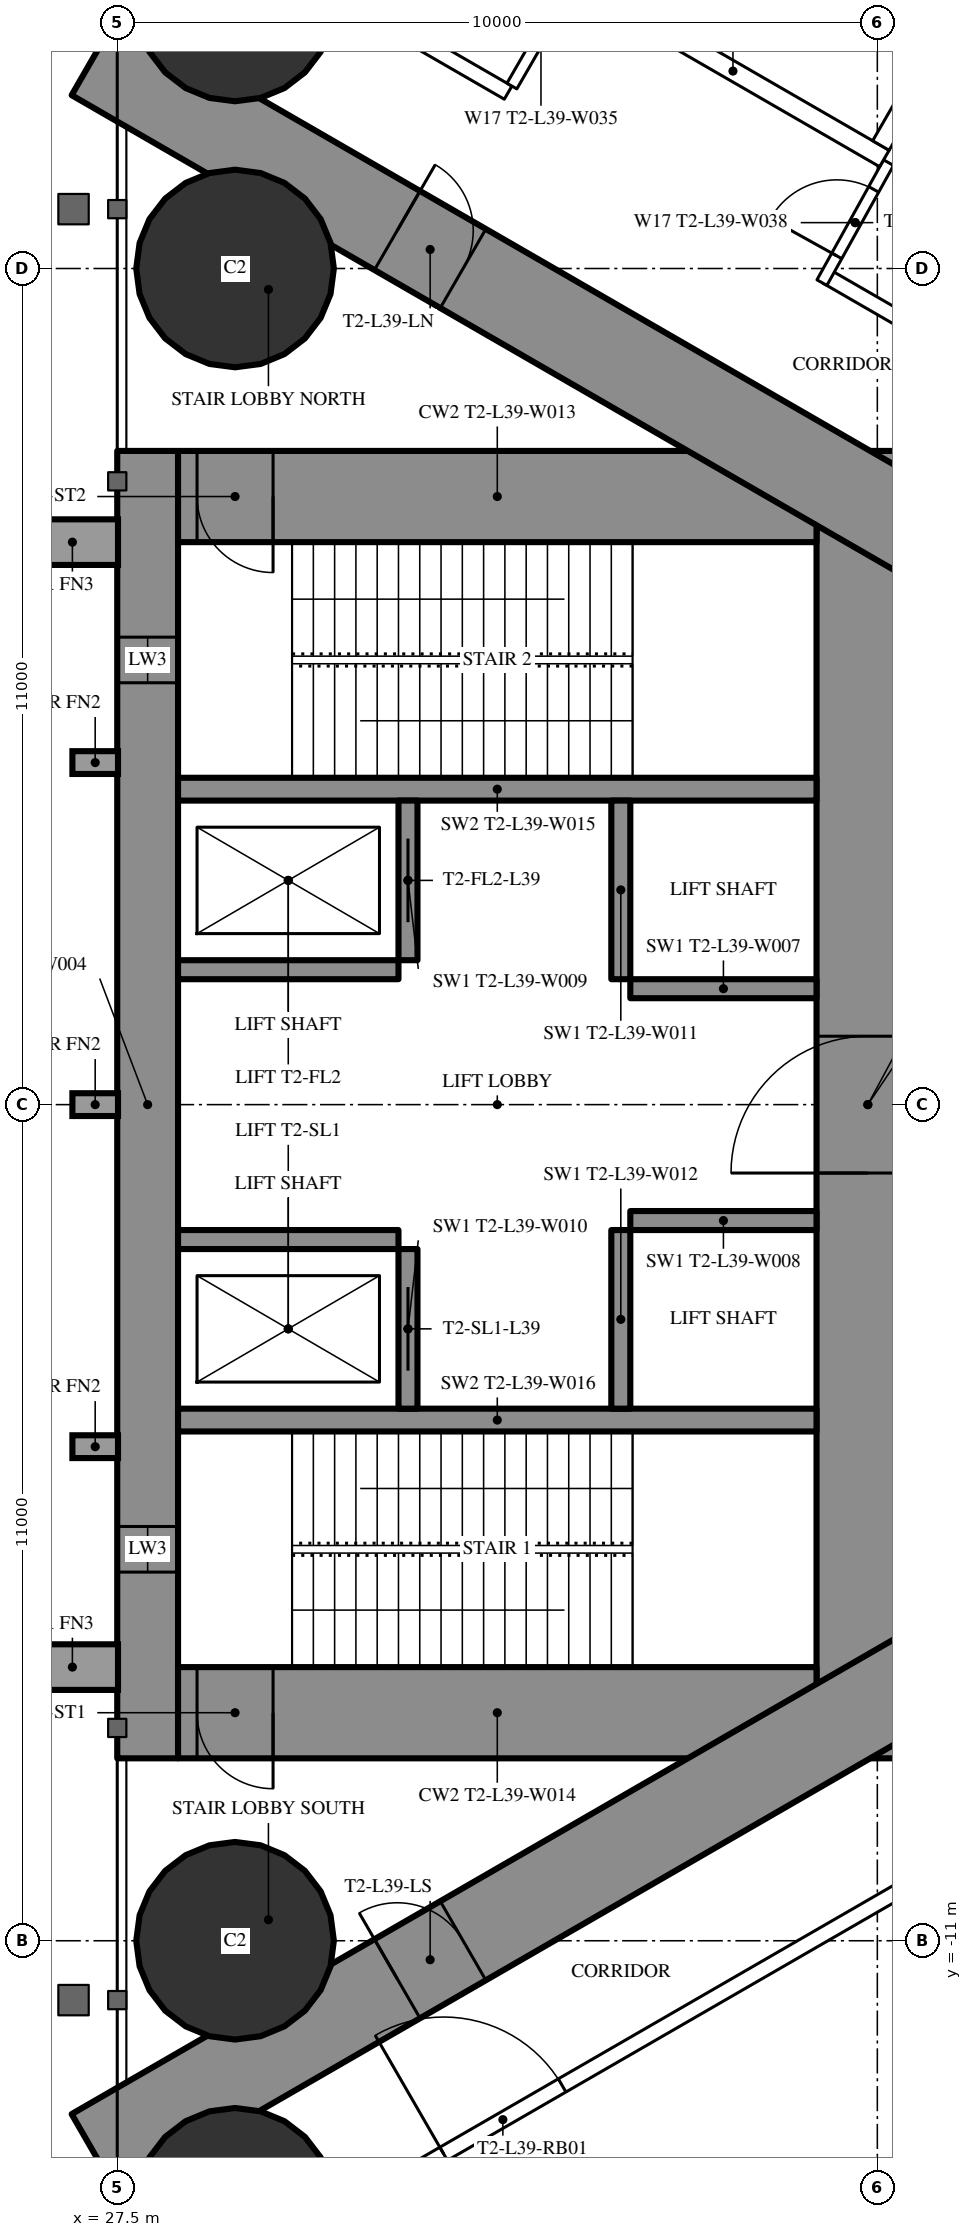
"""IFC4 building model, lengths in metres.
Left out: names, types, materials, properties, quantities, classifications, styles, units other than length and angle.
Written with IfcOpenShell. Run it as: python <this file> out.ifc"""

import sys

from ifc_helpers import new_model, si_unit, direction, frame, frame_2d, origin, origin_2d, place, context, subcontext, project, spatial, rectangle, hollow_circle, extrude, element, fill, save


model = new_model("IFC4")
c1 = context("Model", 3, precision=1e-05, world=origin(), true_north=direction((0.0, 1.0)))
c2 = subcontext(c1, "Body", "Model", "MODEL_VIEW")
j1 = project(units=[si_unit("LENGTHUNIT", "METRE"), si_unit("PLANEANGLEUNIT", "RADIAN")], contexts=[c1])
p1 = place(None, origin())
s1 = spatial("IfcSite", under=j1, at=p1, CompositionType="ELEMENT")
p2 = place(p1, origin())
s2 = spatial("IfcBuilding", under=s1, at=p2, CompositionType="ELEMENT")
p3 = place(p2, frame((0.0, 0.0, 146.7)))
s3 = spatial("IfcBuildingStorey", under=s2, at=p3, CompositionType="ELEMENT", Elevation=146.7)
for number, where, z_axis, x_axis in (
    (1, (29.05, 11.0, 0.0), (0.0, 0.0, 1.0), (1.0, 0.0, 0.0)),
    (2, (29.05, -11.0, 0.0), (0.0, 0.0, 1.0), (1.0, 0.0, 0.0)),
    (3, (29.05, -14.5, 0.0), (0.0, 0.0, 1.0), (1.0, 0.0, 0.0)),
    (4, (29.05, 14.5, 0.0), (0.0, 0.0, 1.0), (1.0, 0.0, 0.0)),
):
    element("IfcColumn", number, at=place(p3, frame(where, z_axis=z_axis, x_axis=x_axis)), inside=s3, PredefinedType="COLUMN", context=c2, shape_type="SweptSolid", body=[
        extrude(hollow_circle(Radius=1.3, WallThickness=0.1, at=origin_2d()), origin(), (0.0, 0.0, 1.0), 6.0),
    ])
p4 = place(p3, frame((27.9, -8.6, 0.0), z_axis=(0.0, 0.0, 1.0), x_axis=(0.0, 1.0, 0.0)))
e5 = element("IfcWall", 5, at=p4, inside=s3, PredefinedType="SHEAR", context=c2, shape_type="SweptSolid", body=[
    extrude(rectangle(XDim=17.2, YDim=0.8, at=frame_2d((8.6, 0.0))), origin(), (0.0, 0.0, 1.0), 6.0),
])
p5 = place(p4, frame((2.45, 0.0, 0.6)))
e6 = element("IfcOpeningElement", 6, at=p5, cuts=e5, PredefinedType="OPENING", context=c2, shape_type="SweptSolid", body=[
    extrude(rectangle(XDim=0.6, YDim=4.5, at=frame_2d((0.3, 2.25))), frame((0.0, 0.41, 0.0), z_axis=(0.0, -1.0, 0.0), x_axis=(1.0, 0.0, 0.0)), (0.0, 0.0, 1.0), 0.82),
])
p6 = place(p4, frame((14.15, 0.0, 0.6)))
e7 = element("IfcOpeningElement", 7, at=p6, cuts=e5, PredefinedType="OPENING", context=c2, shape_type="SweptSolid", body=[
    extrude(rectangle(XDim=0.6, YDim=4.5, at=frame_2d((0.3, 2.25))), frame((0.0, 0.41, 0.0), z_axis=(0.0, -1.0, 0.0), x_axis=(1.0, 0.0, 0.0)), (0.0, 0.0, 1.0), 0.82),
])
p7 = place(p3, frame((37.375, -8.6, 0.0), z_axis=(0.0, 0.0, 1.0), x_axis=(0.0, 1.0, 0.0)))
e8 = element("IfcWall", 8, at=p7, inside=s3, PredefinedType="SHEAR", context=c2, shape_type="SweptSolid", body=[
    extrude(rectangle(XDim=17.2, YDim=1.35, at=frame_2d((8.6, 0.0))), origin(), (0.0, 0.0, 1.0), 6.0),
])
p8 = place(p7, frame((7.7, 0.0, 0.0)))
e9 = element("IfcOpeningElement", 9, at=p8, cuts=e8, PredefinedType="OPENING", context=c2, shape_type="SweptSolid", body=[
    extrude(rectangle(XDim=1.8, YDim=2.2, at=frame_2d((0.9, 1.1))), frame((0.0, 0.685, 0.0), z_axis=(0.0, -1.0, 0.0), x_axis=(1.0, 0.0, 0.0)), (0.0, 0.0, 1.0), 1.37),
])
p9 = place(p3, frame((28.3, -8.0, 0.0), z_axis=(0.0, 0.0, 1.0), x_axis=(1.0, 0.0, 0.0)))
e10 = element("IfcWall", 10, at=p9, inside=s3, PredefinedType="SHEAR", context=c2, shape_type="SweptSolid", body=[
    extrude(rectangle(XDim=8.4, YDim=1.2, at=frame_2d((4.2, 0.0))), origin(), (0.0, 0.0, 1.0), 6.0),
])
p10 = place(p9, frame((0.25, 0.0, 0.0)))
e11 = element("IfcOpeningElement", 11, at=p10, cuts=e10, PredefinedType="OPENING", context=c2, shape_type="SweptSolid", body=[
    extrude(rectangle(XDim=1.0, YDim=2.2, at=frame_2d((0.5, 1.1))), frame((0.0, 0.61, 0.0), z_axis=(0.0, -1.0, 0.0), x_axis=(1.0, 0.0, 0.0)), (0.0, 0.0, 1.0), 1.22),
])
p11 = place(p3, frame((28.3, 8.0, 0.0), z_axis=(0.0, 0.0, 1.0), x_axis=(1.0, 0.0, 0.0)))
e12 = element("IfcWall", 12, at=p11, inside=s3, PredefinedType="SHEAR", context=c2, shape_type="SweptSolid", body=[
    extrude(rectangle(XDim=8.4, YDim=1.2, at=frame_2d((4.2, 0.0))), origin(), (0.0, 0.0, 1.0), 6.0),
])
p12 = place(p11, frame((0.25, 0.0, 0.0)))
e13 = element("IfcOpeningElement", 13, at=p12, cuts=e12, PredefinedType="OPENING", context=c2, shape_type="SweptSolid", body=[
    extrude(rectangle(XDim=1.0, YDim=2.2, at=frame_2d((0.5, 1.1))), frame((0.0, 0.61, 0.0), z_axis=(0.0, -1.0, 0.0), x_axis=(1.0, 0.0, 0.0)), (0.0, 0.0, 1.0), 1.22),
])
for number, where, z_axis, x_axis in (
    (14, (28.3, -4.15, 0.0), (0.0, 0.0, 1.0), (1.0, 0.0, 0.0)),
    (15, (28.3, 4.15, 0.0), (0.0, 0.0, 1.0), (1.0, 0.0, 0.0)),
):
    element("IfcWall", number, at=place(p3, frame(where, z_axis=z_axis, x_axis=x_axis)), inside=s3, PredefinedType="SHEAR", context=c2, shape_type="SweptSolid", body=[
        extrude(rectangle(XDim=8.4, YDim=0.3, at=frame_2d((4.2, 0.0))), origin(), (0.0, 0.0, 1.0), 6.0),
    ])
p13 = place(p3, frame((31.325, -4.0, 0.0), z_axis=(0.0, 0.0, 1.0), x_axis=(0.0, 1.0, 0.0)))
e16 = element("IfcWall", 16, at=p13, inside=s3, PredefinedType="SHEAR", context=c2, shape_type="SweptSolid", body=[
    extrude(rectangle(XDim=2.1, YDim=0.25, at=frame_2d((1.05, 0.0))), origin(), (0.0, 0.0, 1.0), 6.0),
])
p14 = place(p13, frame((0.5, 0.0, 0.0)))
e17 = element("IfcOpeningElement", 17, at=p14, cuts=e16, PredefinedType="OPENING", context=c2, shape_type="SweptSolid", body=[
    extrude(rectangle(XDim=1.1, YDim=2.2, at=frame_2d((0.55, 1.1))), frame((0.0, 0.135, 0.0), z_axis=(0.0, -1.0, 0.0), x_axis=(1.0, 0.0, 0.0)), (0.0, 0.0, 1.0), 0.27),
])
p15 = place(p3, frame((34.125, -4.0, 0.0), z_axis=(0.0, 0.0, 1.0), x_axis=(0.0, 1.0, 0.0)))
e18 = element("IfcWall", 18, at=p15, inside=s3, PredefinedType="SHEAR", context=c2, shape_type="SweptSolid", body=[
    extrude(rectangle(XDim=2.35, YDim=0.25, at=frame_2d((1.175, 0.0))), origin(), (0.0, 0.0, 1.0), 6.0),
])
p16 = place(p3, frame((28.3, -1.775, 0.0), z_axis=(0.0, 0.0, 1.0), x_axis=(1.0, 0.0, 0.0)))
e19 = element("IfcWall", 19, at=p16, inside=s3, PredefinedType="SHEAR", context=c2, shape_type="SweptSolid", body=[
    extrude(rectangle(XDim=2.9, YDim=0.25, at=frame_2d((1.45, 0.0))), origin(), (0.0, 0.0, 1.0), 6.0),
])
p17 = place(p3, frame((34.25, -1.525, 0.0), z_axis=(0.0, 0.0, 1.0), x_axis=(1.0, 0.0, 0.0)))
e20 = element("IfcWall", 20, at=p17, inside=s3, PredefinedType="SHEAR", context=c2, shape_type="SweptSolid", body=[
    extrude(rectangle(XDim=2.45, YDim=0.25, at=frame_2d((1.225, 0.0))), origin(), (0.0, 0.0, 1.0), 6.0),
])
p18 = place(p3, frame((31.325, 1.9, 0.0), z_axis=(0.0, 0.0, 1.0), x_axis=(0.0, 1.0, 0.0)))
e21 = element("IfcWall", 21, at=p18, inside=s3, PredefinedType="SHEAR", context=c2, shape_type="SweptSolid", body=[
    extrude(rectangle(XDim=2.1, YDim=0.25, at=frame_2d((1.05, 0.0))), origin(), (0.0, 0.0, 1.0), 6.0),
])
p19 = place(p18, frame((0.5, 0.0, 0.0)))
e22 = element("IfcOpeningElement", 22, at=p19, cuts=e21, PredefinedType="OPENING", context=c2, shape_type="SweptSolid", body=[
    extrude(rectangle(XDim=1.1, YDim=2.2, at=frame_2d((0.55, 1.1))), frame((0.0, 0.135, 0.0), z_axis=(0.0, -1.0, 0.0), x_axis=(1.0, 0.0, 0.0)), (0.0, 0.0, 1.0), 0.27),
])
p20 = place(p3, frame((34.125, 1.65, 0.0), z_axis=(0.0, 0.0, 1.0), x_axis=(0.0, 1.0, 0.0)))
e23 = element("IfcWall", 23, at=p20, inside=s3, PredefinedType="SHEAR", context=c2, shape_type="SweptSolid", body=[
    extrude(rectangle(XDim=2.35, YDim=0.25, at=frame_2d((1.175, 0.0))), origin(), (0.0, 0.0, 1.0), 6.0),
])
p21 = place(p3, frame((28.3, 1.775, 0.0), z_axis=(0.0, 0.0, 1.0), x_axis=(1.0, 0.0, 0.0)))
e24 = element("IfcWall", 24, at=p21, inside=s3, PredefinedType="SHEAR", context=c2, shape_type="SweptSolid", body=[
    extrude(rectangle(XDim=2.9, YDim=0.25, at=frame_2d((1.45, 0.0))), origin(), (0.0, 0.0, 1.0), 6.0),
])
p22 = place(p3, frame((34.25, 1.525, 0.0), z_axis=(0.0, 0.0, 1.0), x_axis=(1.0, 0.0, 0.0)))
e25 = element("IfcWall", 25, at=p22, inside=s3, PredefinedType="SHEAR", context=c2, shape_type="SweptSolid", body=[
    extrude(rectangle(XDim=2.45, YDim=0.25, at=frame_2d((1.225, 0.0))), origin(), (0.0, 0.0, 1.0), 6.0),
])
p23 = place(p3, frame((27.2, -13.8, 0.0), z_axis=(0.0, 0.0, 1.0), x_axis=(0.866027159892, 0.499996958321, 0.0)))
e26 = element("IfcWall", 26, at=p23, inside=s3, PredefinedType="SHEAR", context=c2, shape_type="SweptSolid", body=[
    extrude(rectangle(XDim=27.947, YDim=1.2, at=frame_2d((13.973, 0.0))), origin(), (0.0, 0.0, 1.0), 6.0),
])
p24 = place(p23, frame((4.6, 0.0, 0.0)))
e27 = element("IfcOpeningElement", 27, at=p24, cuts=e26, PredefinedType="OPENING", context=c2, shape_type="SweptSolid", body=[
    extrude(rectangle(XDim=1.0, YDim=2.2, at=frame_2d((0.5, 1.1))), frame((0.0, 0.61, 0.0), z_axis=(0.0, -1.0, 0.0), x_axis=(1.0, 0.0, 0.0)), (0.0, 0.0, 1.0), 1.22),
])
p25 = place(p23, frame((13.568, 0.0, 0.0)))
e28 = element("IfcOpeningElement", 28, at=p25, cuts=e26, PredefinedType="OPENING", context=c2, shape_type="SweptSolid", body=[
    extrude(rectangle(XDim=1.8, YDim=2.2, at=frame_2d((0.9, 1.1))), frame((0.0, 0.61, 0.0), z_axis=(0.0, -1.0, 0.0), x_axis=(1.0, 0.0, 0.0)), (0.0, 0.0, 1.0), 1.22),
])
p26 = place(p3, frame((27.2, 13.8, 0.0), z_axis=(0.0, 0.0, 1.0), x_axis=(0.866024515034, -0.500001539357, 0.0)))
e29 = element("IfcWall", 29, at=p26, inside=s3, PredefinedType="SHEAR", context=c2, shape_type="SweptSolid", body=[
    extrude(rectangle(XDim=26.907, YDim=1.2, at=frame_2d((13.454, 0.0))), origin(), (0.0, 0.0, 1.0), 6.0),
])
p27 = place(p26, frame((4.6, 0.0, 0.0)))
e30 = element("IfcOpeningElement", 30, at=p27, cuts=e29, PredefinedType="OPENING", context=c2, shape_type="SweptSolid", body=[
    extrude(rectangle(XDim=1.0, YDim=2.2, at=frame_2d((0.5, 1.1))), frame((0.0, 0.61, 0.0), z_axis=(0.0, -1.0, 0.0), x_axis=(1.0, 0.0, 0.0)), (0.0, 0.0, 1.0), 1.22),
])
p28 = place(p26, frame((13.568, 0.0, 0.0)))
e31 = element("IfcOpeningElement", 31, at=p28, cuts=e29, PredefinedType="OPENING", context=c2, shape_type="SweptSolid", body=[
    extrude(rectangle(XDim=1.8, YDim=2.2, at=frame_2d((0.9, 1.1))), frame((0.0, 0.61, 0.0), z_axis=(0.0, -1.0, 0.0), x_axis=(1.0, 0.0, 0.0)), (0.0, 0.0, 1.0), 1.22),
])
p29 = place(p3, frame((27.572, -16.241, 0.0), z_axis=(0.0, 0.0, 1.0), x_axis=(0.86602499815, 0.500000702579, 0.0)))
e32 = element("IfcWall", 32, at=p29, inside=s3, PredefinedType="PARTITIONING", context=c2, shape_type="SweptSolid", body=[
    extrude(rectangle(XDim=32.482, YDim=0.2, at=frame_2d((16.241, 0.0))), origin(), (0.0, 0.0, 1.0), 5.75),
])
p30 = place(p29, frame((4.875, 0.0, 0.0)))
e33 = element("IfcOpeningElement", 33, at=p30, cuts=e32, PredefinedType="OPENING", context=c2, shape_type="SweptSolid", body=[
    extrude(rectangle(XDim=1.8, YDim=2.2, at=frame_2d((0.9, 1.1))), frame((0.0, 0.11, 0.0), z_axis=(0.0, -1.0, 0.0), x_axis=(1.0, 0.0, 0.0)), (0.0, 0.0, 1.0), 0.22),
])
p31 = place(p29, frame((14.24, 0.0, 0.0)))
e34 = element("IfcOpeningElement", 34, at=p31, cuts=e32, PredefinedType="OPENING", context=c2, shape_type="SweptSolid", body=[
    extrude(rectangle(XDim=2.0, YDim=2.4, at=frame_2d((1.0, 1.2))), frame((0.0, 0.11, 0.0), z_axis=(0.0, -1.0, 0.0), x_axis=(1.0, 0.0, 0.0)), (0.0, 0.0, 1.0), 0.22),
])
p32 = place(p29, frame((25.029, 0.0, 0.0)))
e35 = element("IfcOpeningElement", 35, at=p32, cuts=e32, PredefinedType="OPENING", context=c2, shape_type="SweptSolid", body=[
    extrude(rectangle(XDim=1.8, YDim=2.2, at=frame_2d((0.9, 1.1))), frame((0.0, 0.11, 0.0), z_axis=(0.0, -1.0, 0.0), x_axis=(1.0, 0.0, 0.0)), (0.0, 0.0, 1.0), 0.22),
])
p33 = place(p3, frame((27.572, 16.241, 0.0), z_axis=(0.0, 0.0, 1.0), x_axis=(0.866032814021, -0.499987164874, 0.0)))
e36 = element("IfcWall", 36, at=p33, inside=s3, PredefinedType="PARTITIONING", context=c2, shape_type="SweptSolid", body=[
    extrude(rectangle(XDim=5.855, YDim=0.2, at=frame_2d((2.927, 0.0))), origin(), (0.0, 0.0, 1.0), 5.75),
])
p34 = place(p3, frame((36.834, 10.894, 0.0), z_axis=(0.0, 0.0, 1.0), x_axis=(0.866028157229, -0.499995230863, 0.0)))
e37 = element("IfcWall", 37, at=p34, inside=s3, PredefinedType="PARTITIONING", context=c2, shape_type="SweptSolid", body=[
    extrude(rectangle(XDim=21.667, YDim=0.2, at=frame_2d((10.833, 0.0))), origin(), (0.0, 0.0, 1.0), 5.75),
])
p35 = place(p34, frame((16.236, 0.0, 0.0)))
e38 = element("IfcOpeningElement", 38, at=p35, cuts=e37, PredefinedType="OPENING", context=c2, shape_type="SweptSolid", body=[
    extrude(rectangle(XDim=1.8, YDim=2.2, at=frame_2d((0.9, 1.1))), frame((0.0, 0.11, 0.0), z_axis=(0.0, -1.0, 0.0), x_axis=(1.0, 0.0, 0.0)), (0.0, 0.0, 1.0), 0.22),
])
p36 = place(p34, frame((5.796, 0.0, 0.0)))
e39 = element("IfcOpeningElement", 39, at=p36, cuts=e37, PredefinedType="OPENING", context=c2, shape_type="SweptSolid", body=[
    extrude(rectangle(XDim=1.8, YDim=2.2, at=frame_2d((0.9, 1.1))), frame((0.0, 0.11, 0.0), z_axis=(0.0, -1.0, 0.0), x_axis=(1.0, 0.0, 0.0)), (0.0, 0.0, 1.0), 0.22),
])
p37 = place(p3, frame((36.771, 10.814, 0.0), z_axis=(0.0, 0.0, 1.0), x_axis=(0.485585508183, 0.874189175317, 0.0)))
e40 = element("IfcWall", 40, at=p37, inside=s3, PredefinedType="PARTITIONING", context=c2, shape_type="SweptSolid", body=[
    extrude(rectangle(XDim=1.805, YDim=0.15, at=frame_2d((0.902, 0.0))), origin(), (0.0, 0.0, 1.0), 5.75),
])
p38 = place(p37, frame((0.403, 0.0, 0.0)))
e41 = element("IfcOpeningElement", 41, at=p38, cuts=e40, PredefinedType="OPENING", context=c2, shape_type="SweptSolid", body=[
    extrude(rectangle(XDim=1.0, YDim=2.2, at=frame_2d((0.5, 1.1))), frame((0.0, 0.085, 0.0), z_axis=(0.0, -1.0, 0.0), x_axis=(1.0, 0.0, 0.0)), (0.0, 0.0, 1.0), 0.17),
])
p39 = place(p3, frame((32.692, 13.4, 0.0), z_axis=(0.0, 0.0, 1.0), x_axis=(0.499985008713, 0.866034058835, 0.0)))
e42 = element("IfcWall", 42, at=p39, inside=s3, PredefinedType="PARTITIONING", context=c2, shape_type="SweptSolid", body=[
    extrude(rectangle(XDim=1.529, YDim=0.15, at=frame_2d((0.765, 0.0))), origin(), (0.0, 0.0, 1.0), 5.75),
])
p40 = place(p3, frame((33.608, 14.747, 0.0), z_axis=(0.0, 0.0, 1.0), x_axis=(0.866043305498, -0.49996899204, 0.0)))
e43 = element("IfcWall", 43, at=p40, inside=s3, PredefinedType="PARTITIONING", context=c2, shape_type="SweptSolid", body=[
    extrude(rectangle(XDim=4.6, YDim=0.25, at=frame_2d((2.3, 0.0))), origin(), (0.0, 0.0, 1.0), 5.75),
])
p41 = place(p3, frame((37.547, 12.618, 0.0), z_axis=(0.0, 0.0, 1.0), x_axis=(0.499929347863, 0.866066190972, 0.0)))
e44 = element("IfcWall", 44, at=p41, inside=s3, PredefinedType="PARTITIONING", context=c2, shape_type="SweptSolid", body=[
    extrude(rectangle(XDim=3.201, YDim=0.25, at=frame_2d((1.6, 0.0))), origin(), (0.0, 0.0, 1.0), 5.75),
])
p42 = place(p30, origin())
e45 = element("IfcDoor", 45, at=p42, inside=s3, OperationType="DOUBLE_DOOR_SINGLE_SWING", PredefinedType="DOOR", context=c2, shape_type="SweptSolid", body=[
    extrude(rectangle(XDim=1.8, YDim=2.2, at=frame_2d((0.9, 1.1))), frame((0.0, 0.025, 0.0), z_axis=(0.0, -1.0, 0.0), x_axis=(1.0, 0.0, 0.0)), (0.0, 0.0, 1.0), 0.05),
])
fill(e33, e45)
p43 = place(p38, origin())
e46 = element("IfcDoor", 46, at=p43, inside=s3, OperationType="SINGLE_SWING_LEFT", PredefinedType="DOOR", context=c2, shape_type="SweptSolid", body=[
    extrude(rectangle(XDim=1.0, YDim=2.2, at=frame_2d((0.5, 1.1))), frame((0.0, 0.025, 0.0), z_axis=(0.0, -1.0, 0.0), x_axis=(1.0, 0.0, 0.0)), (0.0, 0.0, 1.0), 0.05),
])
fill(e41, e46)
p44 = place(p24, origin())
e47 = element("IfcDoor", 47, at=p44, inside=s3, OperationType="SINGLE_SWING_LEFT", PredefinedType="DOOR", context=c2, shape_type="SweptSolid", body=[
    extrude(rectangle(XDim=1.0, YDim=2.2, at=frame_2d((0.5, 1.1))), frame((0.0, 0.025, 0.0), z_axis=(0.0, -1.0, 0.0), x_axis=(1.0, 0.0, 0.0)), (0.0, 0.0, 1.0), 0.05),
])
fill(e27, e47)
p45 = place(p27, origin())
e48 = element("IfcDoor", 48, at=p45, inside=s3, OperationType="SINGLE_SWING_LEFT", PredefinedType="DOOR", context=c2, shape_type="SweptSolid", body=[
    extrude(rectangle(XDim=1.0, YDim=2.2, at=frame_2d((0.5, 1.1))), frame((0.0, 0.025, 0.0), z_axis=(0.0, -1.0, 0.0), x_axis=(1.0, 0.0, 0.0)), (0.0, 0.0, 1.0), 0.05),
])
fill(e30, e48)
p46 = place(p8, origin())
e49 = element("IfcDoor", 49, at=p46, inside=s3, OperationType="DOUBLE_DOOR_SINGLE_SWING", PredefinedType="DOOR", context=c2, shape_type="SweptSolid", body=[
    extrude(rectangle(XDim=1.8, YDim=2.2, at=frame_2d((0.9, 1.1))), frame((0.0, 0.025, 0.0), z_axis=(0.0, -1.0, 0.0), x_axis=(1.0, 0.0, 0.0)), (0.0, 0.0, 1.0), 0.05),
])
fill(e9, e49)
p47 = place(p10, origin())
e50 = element("IfcDoor", 50, at=p47, inside=s3, OperationType="SINGLE_SWING_RIGHT", PredefinedType="DOOR", context=c2, shape_type="SweptSolid", body=[
    extrude(rectangle(XDim=1.0, YDim=2.2, at=frame_2d((0.5, 1.1))), frame((0.0, 0.025, 0.0), z_axis=(0.0, -1.0, 0.0), x_axis=(1.0, 0.0, 0.0)), (0.0, 0.0, 1.0), 0.05),
])
fill(e11, e50)
p48 = place(p12, origin())
e51 = element("IfcDoor", 51, at=p48, inside=s3, OperationType="SINGLE_SWING_RIGHT", PredefinedType="DOOR", context=c2, shape_type="SweptSolid", body=[
    extrude(rectangle(XDim=1.0, YDim=2.2, at=frame_2d((0.5, 1.1))), frame((0.0, 0.025, 0.0), z_axis=(0.0, -1.0, 0.0), x_axis=(1.0, 0.0, 0.0)), (0.0, 0.0, 1.0), 0.05),
])
fill(e13, e51)
p49 = place(p14, origin())
e52 = element("IfcDoor", 52, at=p49, inside=s3, OperationType="SLIDING_TO_LEFT", PredefinedType="USERDEFINED", context=c2, shape_type="SweptSolid", body=[
    extrude(rectangle(XDim=1.1, YDim=2.2, at=frame_2d((0.55, 1.1))), frame((0.0, 0.025, 0.0), z_axis=(0.0, -1.0, 0.0), x_axis=(1.0, 0.0, 0.0)), (0.0, 0.0, 1.0), 0.05),
])
fill(e17, e52)
p50 = place(p19, origin())
e53 = element("IfcDoor", 53, at=p50, inside=s3, OperationType="SLIDING_TO_LEFT", PredefinedType="USERDEFINED", context=c2, shape_type="SweptSolid", body=[
    extrude(rectangle(XDim=1.1, YDim=2.2, at=frame_2d((0.55, 1.1))), frame((0.0, 0.025, 0.0), z_axis=(0.0, -1.0, 0.0), x_axis=(1.0, 0.0, 0.0)), (0.0, 0.0, 1.0), 0.05),
])
fill(e22, e53)
p51 = place(p5, origin())
e54 = element("IfcWindow", 54, at=p51, inside=s3, PartitioningType="SINGLE_PANEL", PredefinedType="WINDOW", context=c2, shape_type="SweptSolid", body=[
    extrude(rectangle(XDim=0.6, YDim=4.5, at=frame_2d((0.3, 2.25))), frame((0.0, 0.03, 0.0), z_axis=(0.0, -1.0, 0.0), x_axis=(1.0, 0.0, 0.0)), (0.0, 0.0, 1.0), 0.06),
])
fill(e6, e54)
p52 = place(p6, origin())
e55 = element("IfcWindow", 55, at=p52, inside=s3, PartitioningType="SINGLE_PANEL", PredefinedType="WINDOW", context=c2, shape_type="SweptSolid", body=[
    extrude(rectangle(XDim=0.6, YDim=4.5, at=frame_2d((0.3, 2.25))), frame((0.0, 0.03, 0.0), z_axis=(0.0, -1.0, 0.0), x_axis=(1.0, 0.0, 0.0)), (0.0, 0.0, 1.0), 0.06),
])
fill(e7, e55)
save(model, sys.argv[1])
